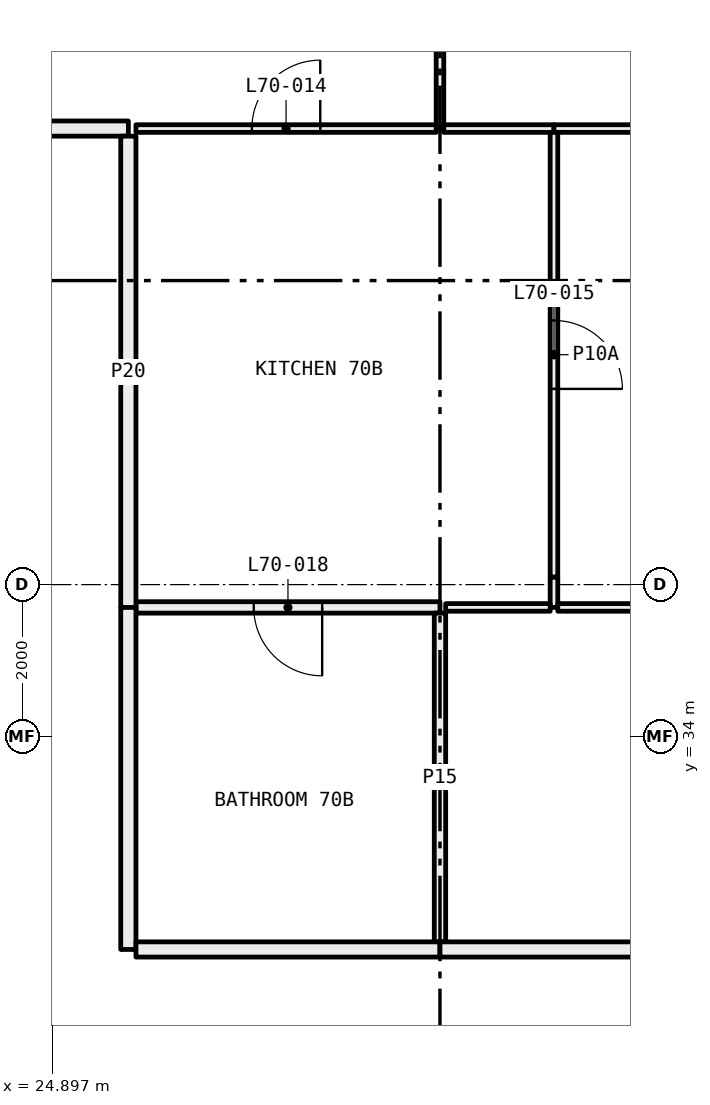
"""IFC4 building model, lengths in metres.
Left out: names, types, materials, properties, quantities, classifications, styles, units other than length and angle.
Written with IfcOpenShell. Run it as: python <this file> out.ifc"""

import sys

from ifc_helpers import new_model, si_unit, direction, frame, frame_2d, origin, place, context, subcontext, project, spatial, rectangle, extrude, element, fill, save


model = new_model("IFC4")
c1 = context("Model", 3, precision=1e-05, world=origin(), true_north=direction((0.0, 1.0)))
c2 = subcontext(c1, "Body", "Model", "MODEL_VIEW")
j1 = project(units=[si_unit("LENGTHUNIT", "METRE"), si_unit("PLANEANGLEUNIT", "RADIAN")], contexts=[c1])
p1 = place(None, origin())
s1 = spatial("IfcSite", under=j1, at=p1, CompositionType="ELEMENT")
p2 = place(p1, origin())
s2 = spatial("IfcBuilding", under=s1, at=p2, CompositionType="ELEMENT")
p3 = place(p2, frame((0.0, 0.0, 259.35)))
s3 = spatial("IfcBuildingStorey", under=s2, at=p3, CompositionType="ELEMENT", Elevation=259.35)
p4 = place(p3, frame((30.0, 42.0, 0.0), z_axis=(0.0, 0.0, 1.0), x_axis=(0.0, 1.0, 0.0)))
e1 = element("IfcWall", 1, at=p4, inside=s3, PredefinedType="PARTITIONING", context=c2, shape_type="SweptSolid", body=[
    extrude(rectangle(XDim=5.28, YDim=0.1, at=frame_2d((2.64, 0.0))), origin(), (0.0, 0.0, 1.0), 3.05),
])
p5 = place(p4, frame((2.19, 0.0, 0.0)))
e2 = element("IfcOpeningElement", 2, at=p5, cuts=e1, PredefinedType="OPENING", context=c2, shape_type="SweptSolid", body=[
    extrude(rectangle(XDim=0.9, YDim=2.1, at=frame_2d((0.45, 1.05))), frame((0.0, 0.06, 0.0), z_axis=(0.0, -1.0, 0.0), x_axis=(1.0, 0.0, 0.0)), (0.0, 0.0, 1.0), 0.12),
])
p6 = place(p3, frame((26.0, 42.0, 0.0), z_axis=(0.0, 0.0, 1.0), x_axis=(1.0, 0.0, 0.0)))
e3 = element("IfcWall", 3, at=p6, inside=s3, PredefinedType="PARTITIONING", context=c2, shape_type="SweptSolid", body=[
    extrude(rectangle(XDim=3.95, YDim=0.1, at=frame_2d((1.975, 0.0))), origin(), (0.0, 0.0, 1.0), 3.05),
])
p7 = place(p6, frame((1.525, 0.0, 0.0)))
e4 = element("IfcOpeningElement", 4, at=p7, cuts=e3, PredefinedType="OPENING", context=c2, shape_type="SweptSolid", body=[
    extrude(rectangle(XDim=0.9, YDim=2.1, at=frame_2d((0.45, 1.05))), frame((0.0, 0.06, 0.0), z_axis=(0.0, -1.0, 0.0), x_axis=(1.0, 0.0, 0.0)), (0.0, 0.0, 1.0), 0.12),
])
p8 = place(p3, frame((24.0, 42.0, 0.0), z_axis=(0.0, 0.0, 1.0), x_axis=(1.0, 0.0, 0.0)))
e5 = element("IfcWall", 5, at=p8, inside=s3, PredefinedType="PARTITIONING", context=c2, shape_type="SweptSolid", body=[
    extrude(rectangle(XDim=1.9, YDim=0.2, at=frame_2d((0.95, 0.0))), origin(), (0.0, 0.0, 1.0), 3.05),
])
p9 = place(p3, frame((30.05, 42.0, 0.0), z_axis=(0.0, 0.0, 1.0), x_axis=(1.0, 0.0, 0.0)))
e6 = element("IfcWall", 6, at=p9, inside=s3, PredefinedType="PARTITIONING", context=c2, shape_type="SweptSolid", body=[
    extrude(rectangle(XDim=1.45, YDim=0.1, at=frame_2d((0.725, 0.0))), origin(), (0.0, 0.0, 1.0), 3.05),
])
p10 = place(p3, frame((31.5, 42.0, 0.0), z_axis=(0.0, 0.0, 1.0), x_axis=(1.0, 0.0, 0.0)))
e7 = element("IfcWall", 7, at=p10, inside=s3, PredefinedType="PARTITIONING", context=c2, shape_type="SweptSolid", body=[
    extrude(rectangle(XDim=4.425, YDim=0.1, at=frame_2d((2.212, 0.0))), origin(), (0.0, 0.0, 1.0), 2.45),
])
p11 = place(p3, frame((31.5, 35.7, 0.0), z_axis=(0.0, 0.0, 1.0), x_axis=(0.0, 1.0, 0.0)))
e8 = element("IfcWall", 8, at=p11, inside=s3, PredefinedType="PARTITIONING", context=c2, shape_type="SweptSolid", body=[
    extrude(rectangle(XDim=0.4, YDim=0.1, at=frame_2d((0.2, 0.0))), origin(), (0.0, 0.0, 1.0), 2.45),
])
p12 = place(p3, frame((31.5, 36.1, 0.0), z_axis=(0.0, 0.0, 1.0), x_axis=(0.0, 1.0, 0.0)))
e9 = element("IfcWall", 9, at=p12, inside=s3, PredefinedType="PARTITIONING", context=c2, shape_type="SweptSolid", body=[
    extrude(rectangle(XDim=5.85, YDim=0.1, at=frame_2d((2.925, 0.0))), origin(), (0.0, 0.0, 1.0), 3.05),
])
p13 = place(p12, frame((2.475, 0.0, 0.0)))
e10 = element("IfcOpeningElement", 10, at=p13, cuts=e9, PredefinedType="OPENING", context=c2, shape_type="SweptSolid", body=[
    extrude(rectangle(XDim=0.9, YDim=2.1, at=frame_2d((0.45, 1.05))), frame((0.0, 0.06, 0.0), z_axis=(0.0, -1.0, 0.0), x_axis=(1.0, 0.0, 0.0)), (0.0, 0.0, 1.0), 0.12),
])
p14 = place(p3, frame((26.0, 35.7, 0.0), z_axis=(0.0, 0.0, 1.0), x_axis=(1.0, 0.0, 0.0)))
e11 = element("IfcWall", 11, at=p14, inside=s3, PredefinedType="PARTITIONING", context=c2, shape_type="SweptSolid", body=[
    extrude(rectangle(XDim=4.0, YDim=0.15, at=frame_2d((2.0, 0.0))), origin(), (0.0, 0.0, 1.0), 3.05),
])
p15 = place(p14, frame((1.55, 0.0, 0.0)))
e12 = element("IfcOpeningElement", 12, at=p15, cuts=e11, PredefinedType="OPENING", context=c2, shape_type="SweptSolid", body=[
    extrude(rectangle(XDim=0.9, YDim=2.1, at=frame_2d((0.45, 1.05))), frame((0.0, 0.085, 0.0), z_axis=(0.0, -1.0, 0.0), x_axis=(1.0, 0.0, 0.0)), (0.0, 0.0, 1.0), 0.17),
])
p16 = place(p3, frame((30.075, 35.7, 0.0), z_axis=(0.0, 0.0, 1.0), x_axis=(1.0, 0.0, 0.0)))
e13 = element("IfcWall", 13, at=p16, inside=s3, PredefinedType="PARTITIONING", context=c2, shape_type="SweptSolid", body=[
    extrude(rectangle(XDim=1.375, YDim=0.1, at=frame_2d((0.688, 0.0))), origin(), (0.0, 0.0, 1.0), 3.05),
])
p17 = place(p3, frame((25.9, 41.9, 0.0), z_axis=(0.0, 0.0, 1.0), x_axis=(0.0, -1.0, 0.0)))
e14 = element("IfcWall", 14, at=p17, inside=s3, PredefinedType="PARTITIONING", context=c2, shape_type="SweptSolid", body=[
    extrude(rectangle(XDim=6.2, YDim=0.2, at=frame_2d((3.1, 0.0))), origin(), (0.0, 0.0, 1.0), 2.45),
])
p18 = place(p3, frame((31.55, 35.7, 0.0), z_axis=(0.0, 0.0, 1.0), x_axis=(1.0, 0.0, 0.0)))
e15 = element("IfcWall", 15, at=p18, inside=s3, PredefinedType="PARTITIONING", context=c2, shape_type="SweptSolid", body=[
    extrude(rectangle(XDim=3.9, YDim=0.1, at=frame_2d((1.95, 0.0))), origin(), (0.0, 0.0, 1.0), 3.05),
])
p19 = place(p18, frame((1.5, 0.0, 0.0)))
e16 = element("IfcOpeningElement", 16, at=p19, cuts=e15, PredefinedType="OPENING", context=c2, shape_type="SweptSolid", body=[
    extrude(rectangle(XDim=0.9, YDim=2.1, at=frame_2d((0.45, 1.05))), frame((0.0, 0.06, 0.0), z_axis=(0.0, -1.0, 0.0), x_axis=(1.0, 0.0, 0.0)), (0.0, 0.0, 1.0), 0.12),
])
p20 = place(p3, frame((30.0, 31.3, 0.0), z_axis=(0.0, 0.0, 1.0), x_axis=(0.0, 1.0, 0.0)))
e17 = element("IfcWall", 17, at=p20, inside=s3, PredefinedType="PARTITIONING", context=c2, shape_type="SweptSolid", body=[
    extrude(rectangle(XDim=4.325, YDim=0.15, at=frame_2d((2.163, 0.0))), origin(), (0.0, 0.0, 1.0), 3.05),
])
p21 = place(p3, frame((25.9, 35.7, 0.0), z_axis=(0.0, 0.0, 1.0), x_axis=(0.0, -1.0, 0.0)))
e18 = element("IfcWall", 18, at=p21, inside=s3, PredefinedType="PARTITIONING", context=c2, shape_type="SweptSolid", body=[
    extrude(rectangle(XDim=4.5, YDim=0.2, at=frame_2d((2.25, 0.0))), origin(), (0.0, 0.0, 1.0), 3.05),
])
p22 = place(p3, frame((26.0, 31.2, 0.0), z_axis=(0.0, 0.0, 1.0), x_axis=(1.0, 0.0, 0.0)))
e19 = element("IfcWall", 19, at=p22, inside=s3, PredefinedType="PARTITIONING", context=c2, shape_type="SweptSolid", body=[
    extrude(rectangle(XDim=4.0, YDim=0.2, at=frame_2d((2.0, 0.0))), origin(), (0.0, 0.0, 1.0), 3.05),
])
p23 = place(p3, frame((30.0, 31.2, 0.0), z_axis=(0.0, 0.0, 1.0), x_axis=(1.0, 0.0, 0.0)))
e20 = element("IfcWall", 20, at=p23, inside=s3, PredefinedType="PARTITIONING", context=c2, shape_type="SweptSolid", body=[
    extrude(rectangle(XDim=6.1, YDim=0.2, at=frame_2d((3.05, 0.0))), origin(), (0.0, 0.0, 1.0), 2.45),
])
p24 = place(p7, origin())
e21 = element("IfcDoor", 21, at=p24, inside=s3, OperationType="SINGLE_SWING_LEFT", PredefinedType="DOOR", context=c2, shape_type="SweptSolid", body=[
    extrude(rectangle(XDim=0.9, YDim=2.1, at=frame_2d((0.45, 1.05))), frame((0.0, 0.025, 0.0), z_axis=(0.0, -1.0, 0.0), x_axis=(1.0, 0.0, 0.0)), (0.0, 0.0, 1.0), 0.05),
])
fill(e4, e21)
p25 = place(p13, frame((0.9, 0.0, 0.0), x_axis=(-1.0, 0.0, 0.0)))
e22 = element("IfcDoor", 22, at=p25, inside=s3, OperationType="SINGLE_SWING_LEFT", PredefinedType="DOOR", context=c2, shape_type="SweptSolid", body=[
    extrude(rectangle(XDim=0.9, YDim=2.1, at=frame_2d((0.45, 1.05))), frame((0.0, 0.025, 0.0), z_axis=(0.0, -1.0, 0.0), x_axis=(1.0, 0.0, 0.0)), (0.0, 0.0, 1.0), 0.05),
])
fill(e10, e22)
p26 = place(p15, frame((0.9, 0.0, 0.0), x_axis=(-1.0, 0.0, 0.0)))
e23 = element("IfcDoor", 23, at=p26, inside=s3, OperationType="SINGLE_SWING_RIGHT", PredefinedType="DOOR", context=c2, shape_type="SweptSolid", body=[
    extrude(rectangle(XDim=0.9, YDim=2.1, at=frame_2d((0.45, 1.05))), frame((0.0, 0.025, 0.0), z_axis=(0.0, -1.0, 0.0), x_axis=(1.0, 0.0, 0.0)), (0.0, 0.0, 1.0), 0.05),
])
fill(e12, e23)
save(model, sys.argv[1])
